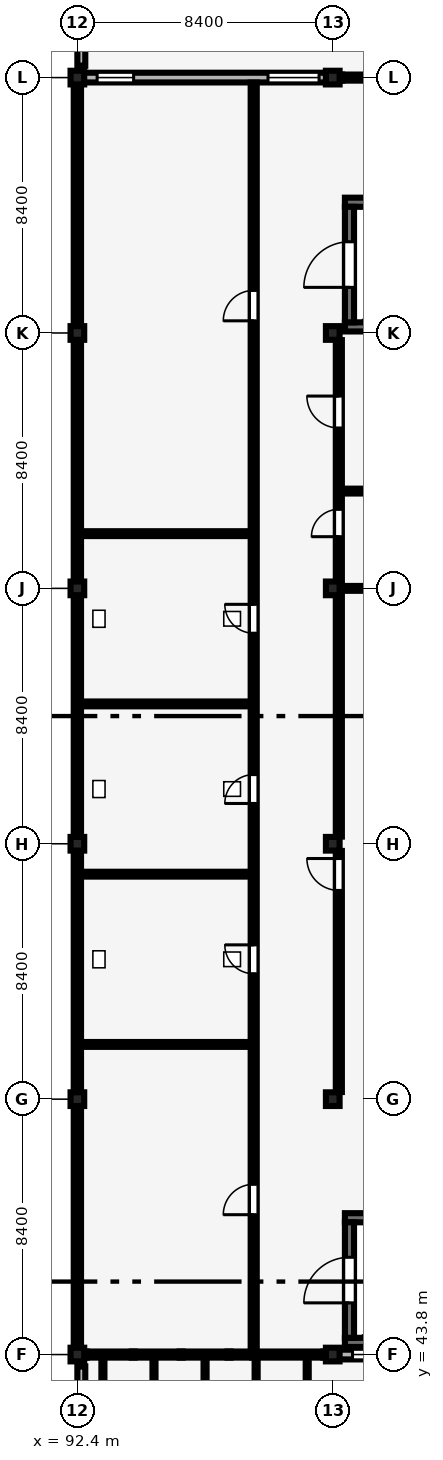
"""IFC4 building model, lengths in metres.
Left out: names, types, materials, properties, quantities, classifications, styles, units other than length and angle.
Written with IfcOpenShell. Run it as: python <this file> out.ifc"""

import sys

from ifc_helpers import new_model, si_unit, direction, frame, frame_2d, origin, origin_2d, place, context, subcontext, project, spatial, rectangle, extrude, element, fill, save


model = new_model("IFC4")
c1 = context("Model", 3, precision=1e-05, world=origin(), true_north=direction((0.0, 1.0)))
c2 = subcontext(c1, "Body", "Model", "MODEL_VIEW")
j1 = project(units=[si_unit("LENGTHUNIT", "METRE"), si_unit("PLANEANGLEUNIT", "RADIAN")], contexts=[c1])
p1 = place(None, origin())
s1 = spatial("IfcSite", under=j1, at=p1, CompositionType="ELEMENT")
p2 = place(p1, origin())
s2 = spatial("IfcBuilding", under=s1, at=p2, CompositionType="ELEMENT")
p3 = place(p2, frame((0.0, 0.0, 17.4)))
s3 = spatial("IfcBuildingStorey", under=s2, at=p3, CompositionType="ELEMENT", Elevation=17.4)
for number, where, z_axis, x_axis in (
    (1, (92.4, 43.8, 0.0), (0.0, 0.0, 1.0), (1.0, 0.0, 0.0)),
    (2, (92.4, 52.2, 0.0), (0.0, 0.0, 1.0), (1.0, 0.0, 0.0)),
    (3, (92.4, 60.6, 0.0), (0.0, 0.0, 1.0), (1.0, 0.0, 0.0)),
    (4, (92.4, 69.0, 0.0), (0.0, 0.0, 1.0), (1.0, 0.0, 0.0)),
    (5, (92.4, 77.4, 0.0), (0.0, 0.0, 1.0), (1.0, 0.0, 0.0)),
    (6, (92.4, 85.8, 0.0), (0.0, 0.0, 1.0), (1.0, 0.0, 0.0)),
    (7, (100.8, 43.8, 0.0), (0.0, 0.0, 1.0), (1.0, 0.0, 0.0)),
    (8, (100.8, 52.2, 0.0), (0.0, 0.0, 1.0), (1.0, 0.0, 0.0)),
    (9, (100.8, 60.6, 0.0), (0.0, 0.0, 1.0), (1.0, 0.0, 0.0)),
    (10, (100.8, 69.0, 0.0), (0.0, 0.0, 1.0), (1.0, 0.0, 0.0)),
    (11, (100.8, 77.4, 0.0), (0.0, 0.0, 1.0), (1.0, 0.0, 0.0)),
    (12, (100.8, 85.8, 0.0), (0.0, 0.0, 1.0), (1.0, 0.0, 0.0)),
):
    element("IfcColumn", number, at=place(p3, frame(where, z_axis=z_axis, x_axis=x_axis)), inside=s3, PredefinedType="COLUMN", context=c2, shape_type="SweptSolid", body=[
        extrude(rectangle(XDim=0.45, YDim=0.45, at=origin_2d()), origin(), (0.0, 0.0, 1.0), 4.2),
    ])
for number, where, z_axis, x_axis in (
    (13, (92.4, 44.0, 0.0), (0.0, 0.0, 1.0), (0.0, 1.0, 0.0)),
    (14, (92.4, 52.4, 0.0), (0.0, 0.0, 1.0), (0.0, 1.0, 0.0)),
    (15, (92.4, 60.8, 0.0), (0.0, 0.0, 1.0), (0.0, 1.0, 0.0)),
    (16, (92.4, 69.2, 0.0), (0.0, 0.0, 1.0), (0.0, 1.0, 0.0)),
    (17, (92.4, 77.6, 0.0), (0.0, 0.0, 1.0), (0.0, 1.0, 0.0)),
):
    element("IfcWall", number, at=place(p3, frame(where, z_axis=z_axis, x_axis=x_axis)), inside=s3, PredefinedType="SOLIDWALL", context=c2, shape_type="SweptSolid", body=[
        extrude(rectangle(XDim=8.0, YDim=0.24, at=frame_2d((4.0, 0.0))), origin(), (0.0, 0.0, 1.0), 1.15),
    ])
p4 = place(p3, frame((101.0, 43.8, 0.0), z_axis=(0.0, 0.0, 1.0), x_axis=(1.0, 0.0, 0.0)))
e18 = element("IfcWall", 18, at=p4, inside=s3, PredefinedType="SOLIDWALL", context=c2, shape_type="SweptSolid", body=[
    extrude(rectangle(XDim=8.0, YDim=0.32, at=frame_2d((4.0, 0.0))), origin(), (0.0, 0.0, 1.0), 3.19),
])
p5 = place(p4, frame((0.45, 0.0, 0.9)))
e19 = element("IfcOpeningElement", 19, at=p5, cuts=e18, PredefinedType="OPENING", context=c2, shape_type="SweptSolid", body=[
    extrude(rectangle(XDim=1.2, YDim=1.5, at=frame_2d((0.6, 0.75))), frame((0.0, 0.17, 0.0), z_axis=(0.0, -1.0, 0.0), x_axis=(1.0, 0.0, 0.0)), (0.0, 0.0, 1.0), 0.34),
])
p6 = place(p4, frame((6.35, 0.0, 0.9)))
e20 = element("IfcOpeningElement", 20, at=p6, cuts=e18, PredefinedType="OPENING", context=c2, shape_type="SweptSolid", body=[
    extrude(rectangle(XDim=1.2, YDim=1.8, at=frame_2d((0.6, 0.9))), frame((0.0, 0.17, 0.0), z_axis=(0.0, -1.0, 0.0), x_axis=(1.0, 0.0, 0.0)), (0.0, 0.0, 1.0), 0.34),
])
p7 = place(p3, frame((92.6, 85.8, 0.0), z_axis=(0.0, 0.0, 1.0), x_axis=(1.0, 0.0, 0.0)))
e21 = element("IfcWall", 21, at=p7, inside=s3, PredefinedType="SOLIDWALL", context=c2, shape_type="SweptSolid", body=[
    extrude(rectangle(XDim=8.0, YDim=0.32, at=frame_2d((4.0, 0.0))), origin(), (0.0, 0.0, 1.0), 3.48),
])
p8 = place(p7, frame((0.45, 0.0, 0.9)))
e22 = element("IfcOpeningElement", 22, at=p8, cuts=e21, PredefinedType="OPENING", context=c2, shape_type="SweptSolid", body=[
    extrude(rectangle(XDim=1.2, YDim=1.8, at=frame_2d((0.6, 0.9))), frame((0.0, 0.17, 0.0), z_axis=(0.0, -1.0, 0.0), x_axis=(1.0, 0.0, 0.0)), (0.0, 0.0, 1.0), 0.34),
])
p9 = place(p7, frame((6.07, 0.0, 0.9)))
e23 = element("IfcOpeningElement", 23, at=p9, cuts=e21, PredefinedType="OPENING", context=c2, shape_type="SweptSolid", body=[
    extrude(rectangle(XDim=1.68, YDim=2.4, at=frame_2d((0.84, 1.2))), frame((0.0, 0.17, 0.0), z_axis=(0.0, -1.0, 0.0), x_axis=(1.0, 0.0, 0.0)), (0.0, 0.0, 1.0), 0.34),
])
p10 = place(p3, frame((92.53, 35.79, 0.0), z_axis=(0.0, 0.0, 1.0), x_axis=(0.0, 1.0, 0.0)))
e24 = element("IfcWall", 24, at=p10, inside=s3, PredefinedType="PARAPET", context=c2, shape_type="SweptSolid", body=[
    extrude(rectangle(XDim=7.62, YDim=0.26, at=frame_2d((3.81, 0.0))), origin(), (0.0, 0.0, 1.0), 0.85),
])
p11 = place(p3, frame((92.53, 86.19, 0.0), z_axis=(0.0, 0.0, 1.0), x_axis=(0.0, 1.0, 0.0)))
e25 = element("IfcWall", 25, at=p11, inside=s3, PredefinedType="PARAPET", context=c2, shape_type="SweptSolid", body=[
    extrude(rectangle(XDim=8.22, YDim=0.26, at=frame_2d((4.11, 0.0))), origin(), (0.0, 0.0, 1.0), 0.85),
])
for number, where, z_axis, x_axis in (
    (26, (101.2, 44.2, 0.0), (0.0, 0.0, 1.0), (1.0, 0.0, 0.0)),
    (27, (101.2, 48.3, 0.0), (0.0, 0.0, 1.0), (1.0, 0.0, 0.0)),
):
    element("IfcWall", number, at=place(p3, frame(where, z_axis=z_axis, x_axis=x_axis)), inside=s3, PredefinedType="SHEAR", context=c2, shape_type="SweptSolid", body=[
        extrude(rectangle(XDim=7.6, YDim=0.3, at=frame_2d((3.8, 0.0))), origin(), (0.0, 0.0, 1.0), 4.025),
    ])
p12 = place(p3, frame((101.35, 44.35, 0.0), z_axis=(0.0, 0.0, 1.0), x_axis=(0.0, 1.0, 0.0)))
e28 = element("IfcWall", 28, at=p12, inside=s3, PredefinedType="SHEAR", context=c2, shape_type="SweptSolid", body=[
    extrude(rectangle(XDim=3.8, YDim=0.3, at=frame_2d((1.9, 0.0))), origin(), (0.0, 0.0, 1.0), 4.025),
])
p13 = place(p12, frame((1.15, 0.0, 0.0)))
e29 = element("IfcOpeningElement", 29, at=p13, cuts=e28, PredefinedType="OPENING", context=c2, shape_type="SweptSolid", body=[
    extrude(rectangle(XDim=1.5, YDim=2.2, at=frame_2d((0.75, 1.1))), frame((0.0, 0.16, 0.0), z_axis=(0.0, -1.0, 0.0), x_axis=(1.0, 0.0, 0.0)), (0.0, 0.0, 1.0), 0.32),
])
for number, where, z_axis, x_axis in (
    (30, (101.2, 77.6, 0.0), (0.0, 0.0, 1.0), (1.0, 0.0, 0.0)),
    (31, (101.2, 81.7, 0.0), (0.0, 0.0, 1.0), (1.0, 0.0, 0.0)),
):
    element("IfcWall", number, at=place(p3, frame(where, z_axis=z_axis, x_axis=x_axis)), inside=s3, PredefinedType="SHEAR", context=c2, shape_type="SweptSolid", body=[
        extrude(rectangle(XDim=7.6, YDim=0.3, at=frame_2d((3.8, 0.0))), origin(), (0.0, 0.0, 1.0), 4.025),
    ])
p14 = place(p3, frame((101.35, 77.75, 0.0), z_axis=(0.0, 0.0, 1.0), x_axis=(0.0, 1.0, 0.0)))
e32 = element("IfcWall", 32, at=p14, inside=s3, PredefinedType="SHEAR", context=c2, shape_type="SweptSolid", body=[
    extrude(rectangle(XDim=3.8, YDim=0.3, at=frame_2d((1.9, 0.0))), origin(), (0.0, 0.0, 1.0), 4.025),
])
p15 = place(p14, frame((1.15, 0.0, 0.0)))
e33 = element("IfcOpeningElement", 33, at=p15, cuts=e32, PredefinedType="OPENING", context=c2, shape_type="SweptSolid", body=[
    extrude(rectangle(XDim=1.5, YDim=2.2, at=frame_2d((0.75, 1.1))), frame((0.0, 0.16, 0.0), z_axis=(0.0, -1.0, 0.0), x_axis=(1.0, 0.0, 0.0)), (0.0, 0.0, 1.0), 0.32),
])
for number, where, z_axis, x_axis in (
    (34, (92.525, 54.0, 0.0), (0.0, 0.0, 1.0), (1.0, 0.0, 0.0)),
    (35, (92.525, 59.6, 0.0), (0.0, 0.0, 1.0), (1.0, 0.0, 0.0)),
    (36, (92.525, 65.2, 0.0), (0.0, 0.0, 1.0), (1.0, 0.0, 0.0)),
    (37, (92.525, 70.8, 0.0), (0.0, 0.0, 1.0), (1.0, 0.0, 0.0)),
):
    element("IfcWall", number, at=place(p3, frame(where, z_axis=z_axis, x_axis=x_axis)), inside=s3, PredefinedType="PARTITIONING", context=c2, shape_type="SweptSolid", body=[
        extrude(rectangle(XDim=5.57, YDim=0.16, at=frame_2d((2.785, 0.0))), origin(), (0.0, 0.0, 1.0), 3.9),
    ])
p16 = place(p3, frame((98.2, 43.905, 0.0), z_axis=(0.0, 0.0, 1.0), x_axis=(0.0, 1.0, 0.0)))
e38 = element("IfcWall", 38, at=p16, inside=s3, PredefinedType="PARTITIONING", context=c2, shape_type="SweptSolid", body=[
    extrude(rectangle(XDim=41.73, YDim=0.2, at=frame_2d((20.865, 0.0))), origin(), (0.0, 0.0, 1.0), 3.9),
])
p17 = place(p16, frame((4.495, 0.0, 0.0)))
e39 = element("IfcOpeningElement", 39, at=p17, cuts=e38, PredefinedType="OPENING", context=c2, shape_type="SweptSolid", body=[
    extrude(rectangle(XDim=1.0, YDim=2.15, at=frame_2d((0.5, 1.075))), frame((0.0, 0.11, 0.0), z_axis=(0.0, -1.0, 0.0), x_axis=(1.0, 0.0, 0.0)), (0.0, 0.0, 1.0), 0.22),
])
p18 = place(p16, frame((12.42, 0.0, 0.0)))
e40 = element("IfcOpeningElement", 40, at=p18, cuts=e38, PredefinedType="OPENING", context=c2, shape_type="SweptSolid", body=[
    extrude(rectangle(XDim=0.95, YDim=2.2, at=frame_2d((0.475, 1.1))), frame((0.0, 0.11, 0.0), z_axis=(0.0, -1.0, 0.0), x_axis=(1.0, 0.0, 0.0)), (0.0, 0.0, 1.0), 0.22),
])
p19 = place(p16, frame((18.02, 0.0, 0.0)))
e41 = element("IfcOpeningElement", 41, at=p19, cuts=e38, PredefinedType="OPENING", context=c2, shape_type="SweptSolid", body=[
    extrude(rectangle(XDim=0.95, YDim=2.2, at=frame_2d((0.475, 1.1))), frame((0.0, 0.11, 0.0), z_axis=(0.0, -1.0, 0.0), x_axis=(1.0, 0.0, 0.0)), (0.0, 0.0, 1.0), 0.22),
])
p20 = place(p16, frame((23.62, 0.0, 0.0)))
e42 = element("IfcOpeningElement", 42, at=p20, cuts=e38, PredefinedType="OPENING", context=c2, shape_type="SweptSolid", body=[
    extrude(rectangle(XDim=0.95, YDim=2.1, at=frame_2d((0.475, 1.05))), frame((0.0, 0.11, 0.0), z_axis=(0.0, -1.0, 0.0), x_axis=(1.0, 0.0, 0.0)), (0.0, 0.0, 1.0), 0.22),
])
p21 = place(p16, frame((33.895, 0.0, 0.0)))
e43 = element("IfcOpeningElement", 43, at=p21, cuts=e38, PredefinedType="OPENING", context=c2, shape_type="SweptSolid", body=[
    extrude(rectangle(XDim=1.0, YDim=2.15, at=frame_2d((0.5, 1.075))), frame((0.0, 0.11, 0.0), z_axis=(0.0, -1.0, 0.0), x_axis=(1.0, 0.0, 0.0)), (0.0, 0.0, 1.0), 0.22),
])
p22 = place(p3, frame((101.105, 69.0, 0.0), z_axis=(0.0, 0.0, 1.0), x_axis=(1.0, 0.0, 0.0)))
e44 = element("IfcWall", 44, at=p22, inside=s3, PredefinedType="PARTITIONING", context=c2, shape_type="SweptSolid", body=[
    extrude(rectangle(XDim=7.93, YDim=0.16, at=frame_2d((3.965, 0.0))), origin(), (0.0, 0.0, 1.0), 3.43),
])
p23 = place(p3, frame((101.105, 72.2, 0.0), z_axis=(0.0, 0.0, 1.0), x_axis=(1.0, 0.0, 0.0)))
e45 = element("IfcWall", 45, at=p23, inside=s3, PredefinedType="PARTITIONING", context=c2, shape_type="SweptSolid", body=[
    extrude(rectangle(XDim=7.99, YDim=0.16, at=frame_2d((3.995, 0.0))), origin(), (0.0, 0.0, 1.0), 3.9),
])
p24 = place(p3, frame((101.0, 52.435, 0.0), z_axis=(0.0, 0.0, 1.0), x_axis=(0.0, 1.0, 0.0)))
e46 = element("IfcWall", 46, at=p24, inside=s3, PredefinedType="PARTITIONING", context=c2, shape_type="SweptSolid", body=[
    extrude(rectangle(XDim=7.93, YDim=0.2, at=frame_2d((3.965, 0.0))), origin(), (0.0, 0.0, 1.0), 3.13),
])
p25 = place(p24, frame((6.63, 0.0, 0.0)))
e47 = element("IfcOpeningElement", 47, at=p25, cuts=e46, PredefinedType="OPENING", context=c2, shape_type="SweptSolid", body=[
    extrude(rectangle(XDim=1.05, YDim=2.2, at=frame_2d((0.525, 1.1))), frame((0.0, 0.11, 0.0), z_axis=(0.0, -1.0, 0.0), x_axis=(1.0, 0.0, 0.0)), (0.0, 0.0, 1.0), 0.22),
])
p26 = place(p3, frame((101.0, 60.835, 0.0), z_axis=(0.0, 0.0, 1.0), x_axis=(0.0, 1.0, 0.0)))
e48 = element("IfcWall", 48, at=p26, inside=s3, PredefinedType="PARTITIONING", context=c2, shape_type="SweptSolid", body=[
    extrude(rectangle(XDim=7.93, YDim=0.2, at=frame_2d((3.965, 0.0))), origin(), (0.0, 0.0, 1.0), 3.43),
])
p27 = place(p3, frame((101.0, 69.235, 0.0), z_axis=(0.0, 0.0, 1.0), x_axis=(0.0, 1.0, 0.0)))
e49 = element("IfcWall", 49, at=p27, inside=s3, PredefinedType="PARTITIONING", context=c2, shape_type="SweptSolid", body=[
    extrude(rectangle(XDim=7.93, YDim=0.2, at=frame_2d((3.965, 0.0))), origin(), (0.0, 0.0, 1.0), 3.48),
])
p28 = place(p27, frame((1.465, 0.0, 0.0)))
e50 = element("IfcOpeningElement", 50, at=p28, cuts=e49, PredefinedType="OPENING", context=c2, shape_type="SweptSolid", body=[
    extrude(rectangle(XDim=0.9, YDim=2.1, at=frame_2d((0.45, 1.05))), frame((0.0, 0.11, 0.0), z_axis=(0.0, -1.0, 0.0), x_axis=(1.0, 0.0, 0.0)), (0.0, 0.0, 1.0), 0.22),
])
p29 = place(p27, frame((5.04, 0.0, 0.0)))
e51 = element("IfcOpeningElement", 51, at=p29, cuts=e49, PredefinedType="OPENING", context=c2, shape_type="SweptSolid", body=[
    extrude(rectangle(XDim=1.05, YDim=2.2, at=frame_2d((0.525, 1.1))), frame((0.0, 0.11, 0.0), z_axis=(0.0, -1.0, 0.0), x_axis=(1.0, 0.0, 0.0)), (0.0, 0.0, 1.0), 0.22),
])
p30 = place(p5, origin())
e52 = element("IfcWindow", 52, at=p30, inside=s3, PartitioningType="SINGLE_PANEL", PredefinedType="WINDOW", context=c2, shape_type="SweptSolid", body=[
    extrude(rectangle(XDim=1.2, YDim=1.5, at=frame_2d((0.6, 0.75))), frame((0.0, 0.03, 0.0), z_axis=(0.0, -1.0, 0.0), x_axis=(1.0, 0.0, 0.0)), (0.0, 0.0, 1.0), 0.06),
])
fill(e19, e52)
p31 = place(p8, origin())
e53 = element("IfcWindow", 53, at=p31, inside=s3, PartitioningType="SINGLE_PANEL", PredefinedType="WINDOW", context=c2, shape_type="SweptSolid", body=[
    extrude(rectangle(XDim=1.2, YDim=1.8, at=frame_2d((0.6, 0.9))), frame((0.0, 0.03, 0.0), z_axis=(0.0, -1.0, 0.0), x_axis=(1.0, 0.0, 0.0)), (0.0, 0.0, 1.0), 0.06),
])
fill(e22, e53)
p32 = place(p9, origin())
e54 = element("IfcWindow", 54, at=p32, inside=s3, PartitioningType="SINGLE_PANEL", PredefinedType="WINDOW", context=c2, shape_type="SweptSolid", body=[
    extrude(rectangle(XDim=1.68, YDim=2.4, at=frame_2d((0.84, 1.2))), frame((0.0, 0.03, 0.0), z_axis=(0.0, -1.0, 0.0), x_axis=(1.0, 0.0, 0.0)), (0.0, 0.0, 1.0), 0.06),
])
fill(e23, e54)
p33 = place(p13, origin())
e55 = element("IfcDoor", 55, at=p33, inside=s3, OperationType="DOUBLE_DOOR_SINGLE_SWING", PredefinedType="DOOR", context=c2, shape_type="SweptSolid", body=[
    extrude(rectangle(XDim=1.5, YDim=2.2, at=frame_2d((0.75, 1.1))), frame((0.0, 0.025, 0.0), z_axis=(0.0, -1.0, 0.0), x_axis=(1.0, 0.0, 0.0)), (0.0, 0.0, 1.0), 0.05),
])
fill(e29, e55)
p34 = place(p15, origin())
e56 = element("IfcDoor", 56, at=p34, inside=s3, OperationType="DOUBLE_DOOR_SINGLE_SWING", PredefinedType="DOOR", context=c2, shape_type="SweptSolid", body=[
    extrude(rectangle(XDim=1.5, YDim=2.2, at=frame_2d((0.75, 1.1))), frame((0.0, 0.025, 0.0), z_axis=(0.0, -1.0, 0.0), x_axis=(1.0, 0.0, 0.0)), (0.0, 0.0, 1.0), 0.05),
])
fill(e33, e56)
p35 = place(p17, origin())
e57 = element("IfcDoor", 57, at=p35, inside=s3, OperationType="SINGLE_SWING_LEFT", PredefinedType="DOOR", context=c2, shape_type="SweptSolid", body=[
    extrude(rectangle(XDim=1.0, YDim=2.15, at=frame_2d((0.5, 1.075))), frame((0.0, 0.025, 0.0), z_axis=(0.0, -1.0, 0.0), x_axis=(1.0, 0.0, 0.0)), (0.0, 0.0, 1.0), 0.05),
])
fill(e39, e57)
p36 = place(p18, origin())
e58 = element("IfcDoor", 58, at=p36, inside=s3, OperationType="SINGLE_SWING_RIGHT", PredefinedType="DOOR", context=c2, shape_type="SweptSolid", body=[
    extrude(rectangle(XDim=0.95, YDim=2.2, at=frame_2d((0.475, 1.1))), frame((0.0, 0.025, 0.0), z_axis=(0.0, -1.0, 0.0), x_axis=(1.0, 0.0, 0.0)), (0.0, 0.0, 1.0), 0.05),
])
fill(e40, e58)
p37 = place(p19, origin())
e59 = element("IfcDoor", 59, at=p37, inside=s3, OperationType="SINGLE_SWING_LEFT", PredefinedType="DOOR", context=c2, shape_type="SweptSolid", body=[
    extrude(rectangle(XDim=0.95, YDim=2.2, at=frame_2d((0.475, 1.1))), frame((0.0, 0.025, 0.0), z_axis=(0.0, -1.0, 0.0), x_axis=(1.0, 0.0, 0.0)), (0.0, 0.0, 1.0), 0.05),
])
fill(e41, e59)
p38 = place(p20, origin())
e60 = element("IfcDoor", 60, at=p38, inside=s3, OperationType="SINGLE_SWING_RIGHT", PredefinedType="DOOR", context=c2, shape_type="SweptSolid", body=[
    extrude(rectangle(XDim=0.95, YDim=2.1, at=frame_2d((0.475, 1.05))), frame((0.0, 0.025, 0.0), z_axis=(0.0, -1.0, 0.0), x_axis=(1.0, 0.0, 0.0)), (0.0, 0.0, 1.0), 0.05),
])
fill(e42, e60)
p39 = place(p21, origin())
e61 = element("IfcDoor", 61, at=p39, inside=s3, OperationType="SINGLE_SWING_LEFT", PredefinedType="DOOR", context=c2, shape_type="SweptSolid", body=[
    extrude(rectangle(XDim=1.0, YDim=2.15, at=frame_2d((0.5, 1.075))), frame((0.0, 0.025, 0.0), z_axis=(0.0, -1.0, 0.0), x_axis=(1.0, 0.0, 0.0)), (0.0, 0.0, 1.0), 0.05),
])
fill(e43, e61)
p40 = place(p25, origin())
e62 = element("IfcDoor", 62, at=p40, inside=s3, OperationType="SINGLE_SWING_RIGHT", PredefinedType="DOOR", context=c2, shape_type="SweptSolid", body=[
    extrude(rectangle(XDim=1.05, YDim=2.2, at=frame_2d((0.525, 1.1))), frame((0.0, 0.025, 0.0), z_axis=(0.0, -1.0, 0.0), x_axis=(1.0, 0.0, 0.0)), (0.0, 0.0, 1.0), 0.05),
])
fill(e47, e62)
p41 = place(p28, origin())
e63 = element("IfcDoor", 63, at=p41, inside=s3, OperationType="SINGLE_SWING_LEFT", PredefinedType="DOOR", context=c2, shape_type="SweptSolid", body=[
    extrude(rectangle(XDim=0.9, YDim=2.1, at=frame_2d((0.45, 1.05))), frame((0.0, 0.025, 0.0), z_axis=(0.0, -1.0, 0.0), x_axis=(1.0, 0.0, 0.0)), (0.0, 0.0, 1.0), 0.05),
])
fill(e50, e63)
p42 = place(p29, origin())
e64 = element("IfcDoor", 64, at=p42, inside=s3, OperationType="SINGLE_SWING_RIGHT", PredefinedType="DOOR", context=c2, shape_type="SweptSolid", body=[
    extrude(rectangle(XDim=1.05, YDim=2.2, at=frame_2d((0.525, 1.1))), frame((0.0, 0.025, 0.0), z_axis=(0.0, -1.0, 0.0), x_axis=(1.0, 0.0, 0.0)), (0.0, 0.0, 1.0), 0.05),
])
fill(e51, e64)
save(model, sys.argv[1])
